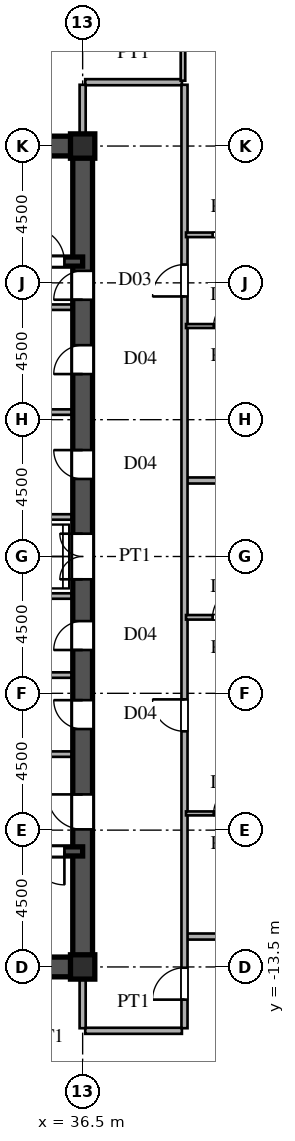
"""IFC4 building model, lengths in metres.
Left out: names, types, materials, properties, quantities, classifications, styles, units other than length and angle.
Written with IfcOpenShell. Run it as: python <this file> out.ifc"""

import sys

from ifc_helpers import new_model, si_unit, direction, frame, frame_2d, origin, origin_2d, place, context, subcontext, project, spatial, rectangle, i_section, extrude, source, transform, mapped, element, fill, save


model = new_model("IFC4")
c1 = context("Model", 3, precision=1e-05, world=origin(), true_north=direction((0.0, 1.0)))
c2 = subcontext(c1, "Body", "Model", "MODEL_VIEW")
j1 = project(units=[si_unit("LENGTHUNIT", "METRE"), si_unit("PLANEANGLEUNIT", "RADIAN")], contexts=[c1])
p1 = place(None, origin())
s1 = spatial("IfcSite", under=j1, at=p1, CompositionType="ELEMENT")
p2 = place(p1, origin())
s2 = spatial("IfcBuilding", under=s1, at=p2, CompositionType="ELEMENT")
p3 = place(p2, frame((0.0, 0.0, 92.4)))
s3 = spatial("IfcBuildingStorey", under=s2, at=p3, CompositionType="ELEMENT", Elevation=92.4)
m1 = source(origin(), c2, "Body", "SweptSolid", [
    extrude(i_section(OverallWidth=0.8, OverallDepth=0.8, WebThickness=0.032, FlangeThickness=0.05, at=origin_2d()), origin(), (0.0, 0.0, 1.0), 3.6),
])
for number, where, z_axis, x_axis in (
    (1, (36.5, -13.5, 0.0), (0.0, 0.0, 1.0), (1.0, 0.0, 0.0)),
    (2, (36.5, 13.5, 0.0), (0.0, 0.0, 1.0), (1.0, 0.0, 0.0)),
):
    element("IfcColumn", number, at=place(p3, frame(where, z_axis=z_axis, x_axis=x_axis)), inside=s3, PredefinedType="COLUMN", context=c2, shape_type="MappedRepresentation", body=[
        mapped(m1, transform((0.0, 0.0, 0.0), scale=1.0)),
    ])
for number, where, z_axis, x_axis in (
    (3, (27.5, -13.5, 0.0), (0.0, 0.0, 1.0), (1.0, 0.0, 0.0)),
    (4, (27.5, 13.5, 0.0), (0.0, 0.0, 1.0), (1.0, 0.0, 0.0)),
):
    element("IfcWall", number, at=place(p3, frame(where, z_axis=z_axis, x_axis=x_axis)), inside=s3, PredefinedType="SHEAR", context=c2, shape_type="SweptSolid", body=[
        extrude(rectangle(XDim=9.0, YDim=0.65, at=frame_2d((4.5, 0.0))), origin(), (0.0, 0.0, 1.0), 3.38),
    ])
p4 = place(p3, frame((36.5, -13.65, 0.0), z_axis=(0.0, 0.0, 1.0), x_axis=(0.0, 1.0, 0.0)))
e5 = element("IfcWall", 5, at=p4, inside=s3, PredefinedType="SHEAR", context=c2, shape_type="SweptSolid", body=[
    extrude(rectangle(XDim=7.15, YDim=0.65, at=frame_2d((3.575, 0.0))), origin(), (0.0, 0.0, 1.0), 3.38),
])
p5 = place(p4, frame((4.675, 0.0, 0.0)))
e6 = element("IfcOpeningElement", 6, at=p5, cuts=e5, PredefinedType="OPENING", context=c2, shape_type="SweptSolid", body=[
    extrude(rectangle(XDim=1.15, YDim=2.2, at=frame_2d((0.575, 1.1))), frame((0.0, 0.335, 0.0), z_axis=(0.0, -1.0, 0.0), x_axis=(1.0, 0.0, 0.0)), (0.0, 0.0, 1.0), 0.67),
])
p6 = place(p3, frame((36.5, -1.3, 0.0), z_axis=(0.0, 0.0, 1.0), x_axis=(0.0, 1.0, 0.0)))
e7 = element("IfcWall", 7, at=p6, inside=s3, PredefinedType="SHEAR", context=c2, shape_type="SweptSolid", body=[
    extrude(rectangle(XDim=2.6, YDim=0.65, at=frame_2d((1.3, 0.0))), origin(), (0.0, 0.0, 1.0), 3.38),
])
p7 = place(p6, frame((0.55, 0.0, 0.0)))
e8 = element("IfcOpeningElement", 8, at=p7, cuts=e7, PredefinedType="OPENING", context=c2, shape_type="SweptSolid", body=[
    extrude(rectangle(XDim=1.5, YDim=2.3, at=frame_2d((0.75, 1.15))), frame((0.0, 0.335, 0.0), z_axis=(0.0, -1.0, 0.0), x_axis=(1.0, 0.0, 0.0)), (0.0, 0.0, 1.0), 0.67),
])
p8 = place(p3, frame((36.5, 8.2, 0.0), z_axis=(0.0, 0.0, 1.0), x_axis=(0.0, 1.0, 0.0)))
e9 = element("IfcWall", 9, at=p8, inside=s3, PredefinedType="SHEAR", context=c2, shape_type="SweptSolid", body=[
    extrude(rectangle(XDim=5.45, YDim=0.65, at=frame_2d((2.725, 0.0))), origin(), (0.0, 0.0, 1.0), 3.38),
])
p9 = place(p8, frame((0.245, 0.0, 0.0)))
e10 = element("IfcOpeningElement", 10, at=p9, cuts=e9, PredefinedType="OPENING", context=c2, shape_type="SweptSolid", body=[
    extrude(rectangle(XDim=0.95, YDim=2.15, at=frame_2d((0.475, 1.075))), frame((0.0, 0.335, 0.0), z_axis=(0.0, -1.0, 0.0), x_axis=(1.0, 0.0, 0.0)), (0.0, 0.0, 1.0), 0.67),
])
p10 = place(p3, frame((36.5, -6.5, 0.0), z_axis=(0.0, 0.0, 1.0), x_axis=(0.0, 1.0, 0.0)))
e11 = element("IfcWall", 11, at=p10, inside=s3, PredefinedType="SHEAR", context=c2, shape_type="SweptSolid", body=[
    extrude(rectangle(XDim=2.6, YDim=0.65, at=frame_2d((1.3, 0.0))), origin(), (0.0, 0.0, 1.0), 3.38),
])
p11 = place(p10, frame((0.825, 0.0, 0.0)))
e12 = element("IfcOpeningElement", 12, at=p11, cuts=e11, PredefinedType="OPENING", context=c2, shape_type="SweptSolid", body=[
    extrude(rectangle(XDim=0.95, YDim=2.15, at=frame_2d((0.475, 1.075))), frame((0.0, 0.335, 0.0), z_axis=(0.0, -1.0, 0.0), x_axis=(1.0, 0.0, 0.0)), (0.0, 0.0, 1.0), 0.67),
])
p12 = place(p3, frame((36.5, -3.9, 0.0), z_axis=(0.0, 0.0, 1.0), x_axis=(0.0, 1.0, 0.0)))
e13 = element("IfcWall", 13, at=p12, inside=s3, PredefinedType="SHEAR", context=c2, shape_type="SweptSolid", body=[
    extrude(rectangle(XDim=2.6, YDim=0.65, at=frame_2d((1.3, 0.0))), origin(), (0.0, 0.0, 1.0), 3.38),
])
p13 = place(p12, frame((0.825, 0.0, 0.0)))
e14 = element("IfcOpeningElement", 14, at=p13, cuts=e13, PredefinedType="OPENING", context=c2, shape_type="SweptSolid", body=[
    extrude(rectangle(XDim=0.95, YDim=2.15, at=frame_2d((0.475, 1.075))), frame((0.0, 0.335, 0.0), z_axis=(0.0, -1.0, 0.0), x_axis=(1.0, 0.0, 0.0)), (0.0, 0.0, 1.0), 0.67),
])
p14 = place(p3, frame((36.5, 1.3, 0.0), z_axis=(0.0, 0.0, 1.0), x_axis=(0.0, 1.0, 0.0)))
e15 = element("IfcWall", 15, at=p14, inside=s3, PredefinedType="SHEAR", context=c2, shape_type="SweptSolid", body=[
    extrude(rectangle(XDim=3.45, YDim=0.65, at=frame_2d((1.725, 0.0))), origin(), (0.0, 0.0, 1.0), 3.38),
])
p15 = place(p14, frame((1.25, 0.0, 0.0)))
e16 = element("IfcOpeningElement", 16, at=p15, cuts=e15, PredefinedType="OPENING", context=c2, shape_type="SweptSolid", body=[
    extrude(rectangle(XDim=0.95, YDim=2.15, at=frame_2d((0.475, 1.075))), frame((0.0, 0.335, 0.0), z_axis=(0.0, -1.0, 0.0), x_axis=(1.0, 0.0, 0.0)), (0.0, 0.0, 1.0), 0.67),
])
p16 = place(p3, frame((36.5, 4.75, 0.0), z_axis=(0.0, 0.0, 1.0), x_axis=(0.0, 1.0, 0.0)))
e17 = element("IfcWall", 17, at=p16, inside=s3, PredefinedType="SHEAR", context=c2, shape_type="SweptSolid", body=[
    extrude(rectangle(XDim=3.45, YDim=0.65, at=frame_2d((1.725, 0.0))), origin(), (0.0, 0.0, 1.0), 3.38),
])
p17 = place(p16, frame((1.25, 0.0, 0.0)))
e18 = element("IfcOpeningElement", 18, at=p17, cuts=e17, PredefinedType="OPENING", context=c2, shape_type="SweptSolid", body=[
    extrude(rectangle(XDim=0.95, YDim=2.15, at=frame_2d((0.475, 1.075))), frame((0.0, 0.335, 0.0), z_axis=(0.0, -1.0, 0.0), x_axis=(1.0, 0.0, 0.0)), (0.0, 0.0, 1.0), 0.67),
])
p18 = place(p3, frame((27.5, -9.7, 0.0), z_axis=(0.0, 0.0, 1.0), x_axis=(1.0, 0.0, 0.0)))
e19 = element("IfcWall", 19, at=p18, inside=s3, PredefinedType="SHEAR", context=c2, shape_type="SweptSolid", body=[
    extrude(rectangle(XDim=9.0, YDim=0.3, at=frame_2d((4.5, 0.0))), origin(), (0.0, 0.0, 1.0), 3.38),
])
p19 = place(p18, frame((7.3, 0.0, 0.0)))
e20 = element("IfcOpeningElement", 20, at=p19, cuts=e19, PredefinedType="OPENING", context=c2, shape_type="SweptSolid", body=[
    extrude(rectangle(XDim=1.1, YDim=2.2, at=frame_2d((0.55, 1.1))), frame((0.0, 0.16, 0.0), z_axis=(0.0, -1.0, 0.0), x_axis=(1.0, 0.0, 0.0)), (0.0, 0.0, 1.0), 0.32),
])
p20 = place(p3, frame((27.5, 9.7, 0.0), z_axis=(0.0, 0.0, 1.0), x_axis=(1.0, 0.0, 0.0)))
e21 = element("IfcWall", 21, at=p20, inside=s3, PredefinedType="SHEAR", context=c2, shape_type="SweptSolid", body=[
    extrude(rectangle(XDim=9.0, YDim=0.3, at=frame_2d((4.5, 0.0))), origin(), (0.0, 0.0, 1.0), 3.38),
])
p21 = place(p20, frame((7.3, 0.0, 0.0)))
e22 = element("IfcOpeningElement", 22, at=p21, cuts=e21, PredefinedType="OPENING", context=c2, shape_type="SweptSolid", body=[
    extrude(rectangle(XDim=1.1, YDim=2.2, at=frame_2d((0.55, 1.1))), frame((0.0, 0.16, 0.0), z_axis=(0.0, -1.0, 0.0), x_axis=(1.0, 0.0, 0.0)), (0.0, 0.0, 1.0), 0.32),
])
for number, where, z_axis, x_axis in (
    (23, (30.45, -6.5, 0.0), (0.0, 0.0, 1.0), (1.0, 0.0, 0.0)),
    (24, (30.45, 8.2, 0.0), (0.0, 0.0, 1.0), (1.0, 0.0, 0.0)),
):
    element("IfcWall", number, at=place(p3, frame(where, z_axis=z_axis, x_axis=x_axis)), inside=s3, PredefinedType="PARTITIONING", context=c2, shape_type="SweptSolid", body=[
        extrude(rectangle(XDim=5.7, YDim=0.18, at=frame_2d((2.85, 0.0))), origin(), (0.0, 0.0, 1.0), 3.38),
    ])
for number, where, z_axis, x_axis in (
    (25, (33.2, -1.3, 0.0), (0.0, 0.0, 1.0), (1.0, 0.0, 0.0)),
    (26, (33.2, 1.3, 0.0), (0.0, 0.0, 1.0), (1.0, 0.0, 0.0)),
    (27, (33.2, -3.9, 0.0), (0.0, 0.0, 1.0), (1.0, 0.0, 0.0)),
    (28, (33.2, 4.75, 0.0), (0.0, 0.0, 1.0), (1.0, 0.0, 0.0)),
):
    element("IfcWall", number, at=place(p3, frame(where, z_axis=z_axis, x_axis=x_axis)), inside=s3, PredefinedType="PARTITIONING", context=c2, shape_type="SweptSolid", body=[
        extrude(rectangle(XDim=2.95, YDim=0.18, at=frame_2d((1.475, 0.0))), origin(), (0.0, 0.0, 1.0), 3.38),
    ])
p22 = place(p3, frame((36.585, -15.6, 0.0), z_axis=(0.0, 0.0, 1.0), x_axis=(1.0, 0.0, 0.0)))
e29 = element("IfcWall", 29, at=p22, inside=s3, PredefinedType="PARTITIONING", context=c2, shape_type="SweptSolid", body=[
    extrude(rectangle(XDim=3.18, YDim=0.2, at=frame_2d((1.59, 0.0))), origin(), (0.0, 0.0, 1.0), 3.38),
])
p23 = place(p3, frame((39.93, -12.5, 0.0), z_axis=(0.0, 0.0, 1.0), x_axis=(1.0, 0.0, 0.0)))
e30 = element("IfcWall", 30, at=p23, inside=s3, PredefinedType="PARTITIONING", context=c2, shape_type="SweptSolid", body=[
    extrude(rectangle(XDim=19.971, YDim=0.2, at=frame_2d((9.985, 0.0))), origin(), (0.0, 0.0, 1.0), 3.38),
])
p24 = place(p3, frame((39.9, -8.45, 0.0), z_axis=(0.0, 0.0, 1.0), x_axis=(1.0, 0.0, 0.0)))
e31 = element("IfcWall", 31, at=p24, inside=s3, PredefinedType="PARTITIONING", context=c2, shape_type="SweptSolid", body=[
    extrude(rectangle(XDim=2.7, YDim=0.13, at=frame_2d((1.35, 0.0))), origin(), (0.0, 0.0, 1.0), 3.38),
])
p25 = place(p24, frame((0.91, 0.0, 0.0)))
e32 = element("IfcOpeningElement", 32, at=p25, cuts=e31, PredefinedType="OPENING", context=c2, shape_type="SweptSolid", body=[
    extrude(rectangle(XDim=0.88, YDim=2.1, at=frame_2d((0.44, 1.05))), frame((0.0, 0.075, 0.0), z_axis=(0.0, -1.0, 0.0), x_axis=(1.0, 0.0, 0.0)), (0.0, 0.0, 1.0), 0.15),
])
p26 = place(p3, frame((39.9, -2.0, 0.0), z_axis=(0.0, 0.0, 1.0), x_axis=(1.0, 0.0, 0.0)))
e33 = element("IfcWall", 33, at=p26, inside=s3, PredefinedType="PARTITIONING", context=c2, shape_type="SweptSolid", body=[
    extrude(rectangle(XDim=2.7, YDim=0.15, at=frame_2d((1.35, 0.0))), origin(), (0.0, 0.0, 1.0), 3.38),
])
p27 = place(p26, frame((0.875, 0.0, 0.0)))
e34 = element("IfcOpeningElement", 34, at=p27, cuts=e33, PredefinedType="OPENING", context=c2, shape_type="SweptSolid", body=[
    extrude(rectangle(XDim=0.95, YDim=2.15, at=frame_2d((0.475, 1.075))), frame((0.0, 0.085, 0.0), z_axis=(0.0, -1.0, 0.0), x_axis=(1.0, 0.0, 0.0)), (0.0, 0.0, 1.0), 0.17),
])
p28 = place(p3, frame((39.93, 2.5, 0.0), z_axis=(0.0, 0.0, 1.0), x_axis=(1.0, 0.0, 0.0)))
e35 = element("IfcWall", 35, at=p28, inside=s3, PredefinedType="PARTITIONING", context=c2, shape_type="SweptSolid", body=[
    extrude(rectangle(XDim=31.075, YDim=0.2, at=frame_2d((15.538, 0.0))), origin(), (0.0, 0.0, 1.0), 3.38),
])
p29 = place(p3, frame((39.9, 7.58, 0.0), z_axis=(0.0, 0.0, 1.0), x_axis=(1.0, 0.0, 0.0)))
e36 = element("IfcWall", 36, at=p29, inside=s3, PredefinedType="PARTITIONING", context=c2, shape_type="SweptSolid", body=[
    extrude(rectangle(XDim=2.7, YDim=0.13, at=frame_2d((1.35, 0.0))), origin(), (0.0, 0.0, 1.0), 3.38),
])
p30 = place(p29, frame((0.91, 0.0, 0.0)))
e37 = element("IfcOpeningElement", 37, at=p30, cuts=e36, PredefinedType="OPENING", context=c2, shape_type="SweptSolid", body=[
    extrude(rectangle(XDim=0.88, YDim=2.1, at=frame_2d((0.44, 1.05))), frame((0.0, 0.075, 0.0), z_axis=(0.0, -1.0, 0.0), x_axis=(1.0, 0.0, 0.0)), (0.0, 0.0, 1.0), 0.15),
])
p31 = place(p3, frame((39.9, 10.58, 0.0), z_axis=(0.0, 0.0, 1.0), x_axis=(1.0, 0.0, 0.0)))
e38 = element("IfcWall", 38, at=p31, inside=s3, PredefinedType="PARTITIONING", context=c2, shape_type="SweptSolid", body=[
    extrude(rectangle(XDim=2.7, YDim=0.15, at=frame_2d((1.35, 0.0))), origin(), (0.0, 0.0, 1.0), 3.38),
])
p32 = place(p31, frame((0.875, 0.0, 0.0)))
e39 = element("IfcOpeningElement", 39, at=p32, cuts=e38, PredefinedType="OPENING", context=c2, shape_type="SweptSolid", body=[
    extrude(rectangle(XDim=0.95, YDim=2.15, at=frame_2d((0.475, 1.075))), frame((0.0, 0.085, 0.0), z_axis=(0.0, -1.0, 0.0), x_axis=(1.0, 0.0, 0.0)), (0.0, 0.0, 1.0), 0.17),
])
p33 = place(p3, frame((36.585, 15.6, 0.0), z_axis=(0.0, 0.0, 1.0), x_axis=(1.0, 0.0, 0.0)))
e40 = element("IfcWall", 40, at=p33, inside=s3, PredefinedType="PARTITIONING", context=c2, shape_type="SweptSolid", body=[
    extrude(rectangle(XDim=3.18, YDim=0.2, at=frame_2d((1.59, 0.0))), origin(), (0.0, 0.0, 1.0), 3.38),
])
for number, where, z_axis, x_axis in (
    (41, (36.5, -15.515, 0.0), (0.0, 0.0, 1.0), (0.0, 1.0, 0.0)),
    (42, (36.5, 13.83, 0.0), (0.0, 0.0, 1.0), (0.0, 1.0, 0.0)),
):
    element("IfcWall", number, at=place(p3, frame(where, z_axis=z_axis, x_axis=x_axis)), inside=s3, PredefinedType="PARTITIONING", context=c2, shape_type="SweptSolid", body=[
        extrude(rectangle(XDim=1.685, YDim=0.2, at=frame_2d((0.842, 0.0))), origin(), (0.0, 0.0, 1.0), 2.68),
    ])
p34 = place(p3, frame((39.8, 15.65, 0.0), z_axis=(0.0, 0.0, 1.0), x_axis=(0.0, 1.0, 0.0)))
e43 = element("IfcWall", 43, at=p34, inside=s3, PredefinedType="PARTITIONING", context=c2, shape_type="SweptSolid", body=[
    extrude(rectangle(XDim=5.925, YDim=0.15, at=frame_2d((2.962, 0.0))), origin(), (0.0, 0.0, 1.0), 3.38),
])
p35 = place(p34, frame((1.425, 0.0, 0.0)))
e44 = element("IfcOpeningElement", 44, at=p35, cuts=e43, PredefinedType="OPENING", context=c2, shape_type="SweptSolid", body=[
    extrude(rectangle(XDim=0.95, YDim=2.15, at=frame_2d((0.475, 1.075))), frame((0.0, 0.085, 0.0), z_axis=(0.0, -1.0, 0.0), x_axis=(1.0, 0.0, 0.0)), (0.0, 0.0, 1.0), 0.17),
])
p36 = place(p3, frame((39.85, -15.515, 0.0), z_axis=(0.0, 0.0, 1.0), x_axis=(0.0, 1.0, 0.0)))
e45 = element("IfcWall", 45, at=p36, inside=s3, PredefinedType="PARTITIONING", context=c2, shape_type="SweptSolid", body=[
    extrude(rectangle(XDim=31.03, YDim=0.2, at=frame_2d((15.515, 0.0))), origin(), (0.0, 0.0, 1.0), 3.38),
])
p37 = place(p36, frame((0.94, 0.0, 0.0)))
e46 = element("IfcOpeningElement", 46, at=p37, cuts=e45, PredefinedType="OPENING", context=c2, shape_type="SweptSolid", body=[
    extrude(rectangle(XDim=1.05, YDim=2.25, at=frame_2d((0.525, 1.125))), frame((0.0, 0.11, 0.0), z_axis=(0.0, -1.0, 0.0), x_axis=(1.0, 0.0, 0.0)), (0.0, 0.0, 1.0), 0.22),
])
p38 = place(p36, frame((9.765, 0.0, 0.0)))
e47 = element("IfcOpeningElement", 47, at=p38, cuts=e45, PredefinedType="OPENING", context=c2, shape_type="SweptSolid", body=[
    extrude(rectangle(XDim=1.05, YDim=2.25, at=frame_2d((0.525, 1.125))), frame((0.0, 0.11, 0.0), z_axis=(0.0, -1.0, 0.0), x_axis=(1.0, 0.0, 0.0)), (0.0, 0.0, 1.0), 0.22),
])
p39 = place(p36, frame((24.067, 0.0, 0.0)))
e48 = element("IfcOpeningElement", 48, at=p39, cuts=e45, PredefinedType="OPENING", context=c2, shape_type="SweptSolid", body=[
    extrude(rectangle(XDim=1.05, YDim=2.25, at=frame_2d((0.525, 1.125))), frame((0.0, 0.11, 0.0), z_axis=(0.0, -1.0, 0.0), x_axis=(1.0, 0.0, 0.0)), (0.0, 0.0, 1.0), 0.22),
])
m2 = source(origin(), c2, "Body", "SweptSolid", [
    extrude(rectangle(XDim=1.15, YDim=2.2, at=frame_2d((0.575, 1.1))), frame((0.0, 0.025, 0.0), z_axis=(0.0, -1.0, 0.0), x_axis=(1.0, 0.0, 0.0)), (0.0, 0.0, 1.0), 0.05),
])
p40 = place(p5, origin())
e49 = element("IfcDoor", 49, at=p40, inside=s3, OperationType="SINGLE_SWING_RIGHT", PredefinedType="DOOR", context=c2, shape_type="MappedRepresentation", body=[
    mapped(m2, transform((0.0, 0.0, 0.0), scale=1.0)),
])
fill(e6, e49)
m3 = source(origin(), c2, "Body", "SweptSolid", [
    extrude(rectangle(XDim=1.5, YDim=2.3, at=frame_2d((0.75, 1.15))), frame((0.0, 0.025, 0.0), z_axis=(0.0, -1.0, 0.0), x_axis=(1.0, 0.0, 0.0)), (0.0, 0.0, 1.0), 0.05),
])
p41 = place(p7, origin())
e50 = element("IfcDoor", 50, at=p41, inside=s3, OperationType="DOUBLE_SWING_LEFT", PredefinedType="DOOR", context=c2, shape_type="MappedRepresentation", body=[
    mapped(m3, transform((0.0, 0.0, 0.0), scale=1.0)),
])
fill(e8, e50)
m4 = source(origin(), c2, "Body", "SweptSolid", [
    extrude(rectangle(XDim=0.95, YDim=2.15, at=frame_2d((0.475, 1.075))), frame((0.0, 0.025, 0.0), z_axis=(0.0, -1.0, 0.0), x_axis=(1.0, 0.0, 0.0)), (0.0, 0.0, 1.0), 0.05),
])
p42 = place(p9, origin())
e51 = element("IfcDoor", 51, at=p42, inside=s3, OperationType="SINGLE_SWING_LEFT", PredefinedType="DOOR", context=c2, shape_type="MappedRepresentation", body=[
    mapped(m4, transform((0.0, 0.0, 0.0), scale=1.0)),
])
fill(e10, e51)
p43 = place(p11, origin())
e52 = element("IfcDoor", 52, at=p43, inside=s3, OperationType="SINGLE_SWING_RIGHT", PredefinedType="DOOR", context=c2, shape_type="MappedRepresentation", body=[
    mapped(m4, transform((0.0, 0.0, 0.0), scale=1.0)),
])
fill(e12, e52)
p44 = place(p13, origin())
e53 = element("IfcDoor", 53, at=p44, inside=s3, OperationType="SINGLE_SWING_LEFT", PredefinedType="DOOR", context=c2, shape_type="MappedRepresentation", body=[
    mapped(m4, transform((0.0, 0.0, 0.0), scale=1.0)),
])
fill(e14, e53)
p45 = place(p15, origin())
e54 = element("IfcDoor", 54, at=p45, inside=s3, OperationType="SINGLE_SWING_RIGHT", PredefinedType="DOOR", context=c2, shape_type="MappedRepresentation", body=[
    mapped(m4, transform((0.0, 0.0, 0.0), scale=1.0)),
])
fill(e16, e54)
p46 = place(p17, origin())
e55 = element("IfcDoor", 55, at=p46, inside=s3, OperationType="SINGLE_SWING_LEFT", PredefinedType="DOOR", context=c2, shape_type="MappedRepresentation", body=[
    mapped(m4, transform((0.0, 0.0, 0.0), scale=1.0)),
])
fill(e18, e55)
m5 = source(origin(), c2, "Body", "SweptSolid", [
    extrude(rectangle(XDim=1.1, YDim=2.2, at=frame_2d((0.55, 1.1))), frame((0.0, 0.025, 0.0), z_axis=(0.0, -1.0, 0.0), x_axis=(1.0, 0.0, 0.0)), (0.0, 0.0, 1.0), 0.05),
])
p47 = place(p19, frame((1.1, 0.0, 0.0), z_axis=(0.0, 0.0, 1.0), x_axis=(-1.0, 0.0, 0.0)))
e56 = element("IfcDoor", 56, at=p47, inside=s3, OperationType="SINGLE_SWING_RIGHT", PredefinedType="DOOR", context=c2, shape_type="MappedRepresentation", body=[
    mapped(m5, transform((0.0, 0.0, 0.0), scale=1.0)),
])
fill(e20, e56)
p48 = place(p21, origin())
e57 = element("IfcDoor", 57, at=p48, inside=s3, OperationType="SINGLE_SWING_LEFT", PredefinedType="DOOR", context=c2, shape_type="MappedRepresentation", body=[
    mapped(m5, transform((0.0, 0.0, 0.0), scale=1.0)),
])
fill(e22, e57)
m6 = source(origin(), c2, "Body", "SweptSolid", [
    extrude(rectangle(XDim=0.88, YDim=2.1, at=frame_2d((0.44, 1.05))), frame((0.0, 0.025, 0.0), z_axis=(0.0, -1.0, 0.0), x_axis=(1.0, 0.0, 0.0)), (0.0, 0.0, 1.0), 0.05),
])
p49 = place(p25, origin())
e58 = element("IfcDoor", 58, at=p49, inside=s3, OperationType="SINGLE_SWING_RIGHT", PredefinedType="DOOR", context=c2, shape_type="MappedRepresentation", body=[
    mapped(m6, transform((0.0, 0.0, 0.0), scale=1.0)),
])
fill(e32, e58)
m7 = source(origin(), c2, "Body", "SweptSolid", [
    extrude(rectangle(XDim=0.95, YDim=2.15, at=frame_2d((0.475, 1.075))), frame((0.0, 0.025, 0.0), z_axis=(0.0, -1.0, 0.0), x_axis=(1.0, 0.0, 0.0)), (0.0, 0.0, 1.0), 0.05),
])
p50 = place(p27, origin())
e59 = element("IfcDoor", 59, at=p50, inside=s3, OperationType="SINGLE_SWING_RIGHT", PredefinedType="DOOR", context=c2, shape_type="MappedRepresentation", body=[
    mapped(m7, transform((0.0, 0.0, 0.0), scale=1.0)),
])
fill(e34, e59)
p51 = place(p30, origin())
e60 = element("IfcDoor", 60, at=p51, inside=s3, OperationType="SINGLE_SWING_RIGHT", PredefinedType="DOOR", context=c2, shape_type="MappedRepresentation", body=[
    mapped(m6, transform((0.0, 0.0, 0.0), scale=1.0)),
])
fill(e37, e60)
m8 = source(origin(), c2, "Body", "SweptSolid", [
    extrude(rectangle(XDim=1.05, YDim=2.25, at=frame_2d((0.525, 1.125))), frame((0.0, 0.025, 0.0), z_axis=(0.0, -1.0, 0.0), x_axis=(1.0, 0.0, 0.0)), (0.0, 0.0, 1.0), 0.05),
])
p52 = place(p37, origin())
e61 = element("IfcDoor", 61, at=p52, inside=s3, OperationType="SINGLE_SWING_LEFT", PredefinedType="DOOR", context=c2, shape_type="MappedRepresentation", body=[
    mapped(m8, transform((0.0, 0.0, 0.0), scale=1.0)),
])
fill(e46, e61)
p53 = place(p38, origin())
e62 = element("IfcDoor", 62, at=p53, inside=s3, OperationType="SINGLE_SWING_RIGHT", PredefinedType="DOOR", context=c2, shape_type="MappedRepresentation", body=[
    mapped(m8, transform((0.0, 0.0, 0.0), scale=1.0)),
])
fill(e47, e62)
p54 = place(p39, origin())
e63 = element("IfcDoor", 63, at=p54, inside=s3, OperationType="SINGLE_SWING_LEFT", PredefinedType="DOOR", context=c2, shape_type="MappedRepresentation", body=[
    mapped(m8, transform((0.0, 0.0, 0.0), scale=1.0)),
])
fill(e48, e63)
save(model, sys.argv[1])
